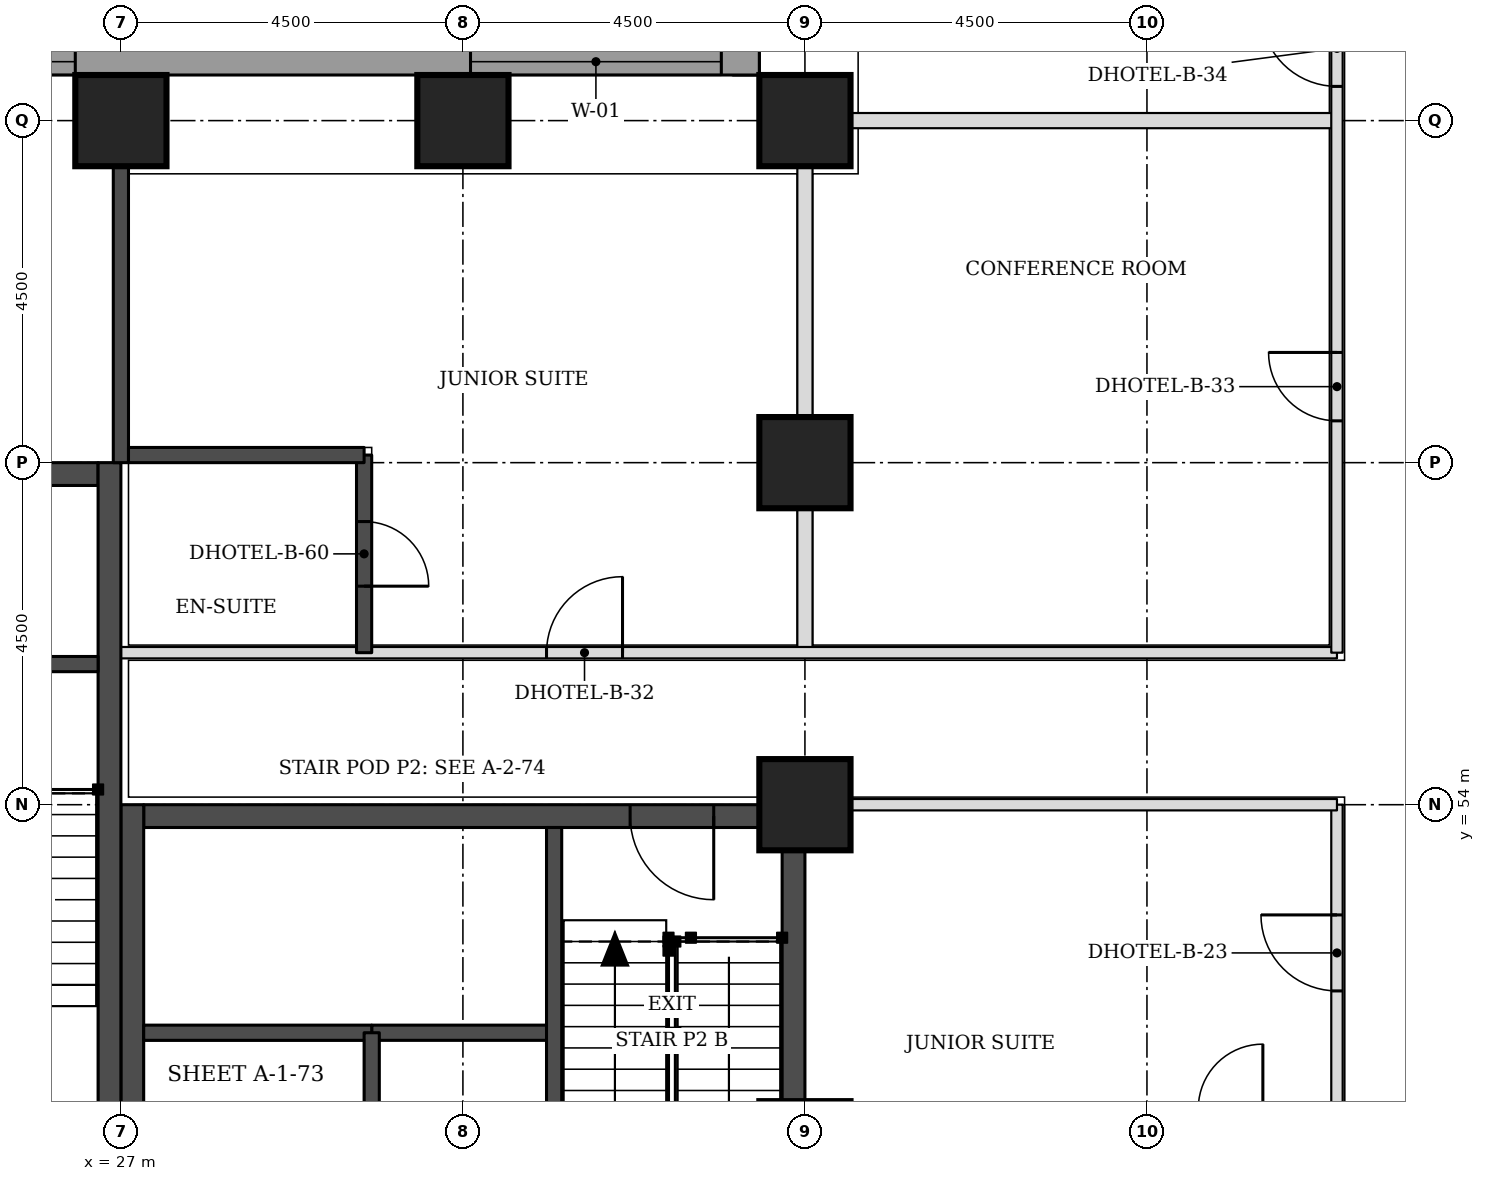
"""IFC4 building model, lengths in metres.
Left out: names, types, materials, properties, quantities, classifications, styles, units other than length and angle.
Written with IfcOpenShell. Run it as: python <this file> out.ifc"""

import sys

from ifc_helpers import new_model, si_unit, direction, frame, frame_2d, origin, origin_2d, place, context, subcontext, project, spatial, rectangle, extrude, element, fill, save


model = new_model("IFC4")
c1 = context("Model", 3, precision=1e-05, world=origin(), true_north=direction((0.0, 1.0)))
c2 = subcontext(c1, "Body", "Model", "MODEL_VIEW")
j1 = project(units=[si_unit("LENGTHUNIT", "METRE"), si_unit("PLANEANGLEUNIT", "RADIAN")], contexts=[c1])
p1 = place(None, origin())
s1 = spatial("IfcSite", under=j1, at=p1, CompositionType="ELEMENT")
p2 = place(p1, origin())
s2 = spatial("IfcBuilding", under=s1, at=p2, CompositionType="ELEMENT")
p3 = place(p2, frame((0.0, 0.0, 29.7)))
s3 = spatial("IfcBuildingStorey", under=s2, at=p3, CompositionType="ELEMENT", Elevation=29.7)
for number, where, z_axis, x_axis in (
    (1, (36.0, 54.0, 0.0), (0.0, 0.0, 1.0), (1.0, 0.0, 0.0)),
    (2, (36.0, 58.5, 0.0), (0.0, 0.0, 1.0), (1.0, 0.0, 0.0)),
    (3, (27.0, 63.0, 0.0), (0.0, 0.0, 1.0), (1.0, 0.0, 0.0)),
    (4, (31.5, 63.0, 0.0), (0.0, 0.0, 1.0), (1.0, 0.0, 0.0)),
    (5, (36.0, 63.0, 0.0), (0.0, 0.0, 1.0), (1.0, 0.0, 0.0)),
):
    element("IfcColumn", number, at=place(p3, frame(where, z_axis=z_axis, x_axis=x_axis)), inside=s3, PredefinedType="COLUMN", context=c2, shape_type="SweptSolid", body=[
        extrude(rectangle(XDim=1.2, YDim=1.2, at=origin_2d()), origin(), (0.0, 0.0, 1.0), 3.3),
    ])
p4 = place(p3, frame((27.3, 53.85, 0.0), z_axis=(0.0, 0.0, 1.0), x_axis=(1.0, 0.0, 0.0)))
e6 = element("IfcWall", 6, at=p4, inside=s3, PredefinedType="SHEAR", context=c2, shape_type="SweptSolid", body=[
    extrude(rectangle(XDim=8.4, YDim=0.3, at=frame_2d((4.2, 0.0))), origin(), (0.0, 0.0, 1.0), 3.3),
])
p5 = place(p4, frame((6.4, 0.0, 0.0)))
e7 = element("IfcOpeningElement", 7, at=p5, cuts=e6, PredefinedType="OPENING", context=c2, shape_type="SweptSolid", body=[
    extrude(rectangle(XDim=1.1, YDim=2.1, at=frame_2d((0.55, 1.05))), frame((0.0, 0.16, 0.0), z_axis=(0.0, -1.0, 0.0), x_axis=(1.0, 0.0, 0.0)), (0.0, 0.0, 1.0), 0.32),
])
p6 = place(p3, frame((27.15, 45.0, 0.0), z_axis=(0.0, 0.0, 1.0), x_axis=(0.0, 1.0, 0.0)))
e8 = element("IfcWall", 8, at=p6, inside=s3, PredefinedType="SHEAR", context=c2, shape_type="SweptSolid", body=[
    extrude(rectangle(XDim=9.0, YDim=0.3, at=frame_2d((4.5, 0.0))), origin(), (0.0, 0.0, 1.0), 3.3),
])
p7 = place(p6, frame((0.4, 0.0, 0.0)))
e9 = element("IfcOpeningElement", 9, at=p7, cuts=e8, PredefinedType="OPENING", context=c2, shape_type="SweptSolid", body=[
    extrude(rectangle(XDim=1.1, YDim=2.1, at=frame_2d((0.55, 1.05))), frame((0.0, 0.16, 0.0), z_axis=(0.0, -1.0, 0.0), x_axis=(1.0, 0.0, 0.0)), (0.0, 0.0, 1.0), 0.32),
])
p8 = place(p3, frame((35.85, 45.0, 0.0), z_axis=(0.0, 0.0, 1.0), x_axis=(0.0, 1.0, 0.0)))
e10 = element("IfcWall", 10, at=p8, inside=s3, PredefinedType="SHEAR", context=c2, shape_type="SweptSolid", body=[
    extrude(rectangle(XDim=9.0, YDim=0.3, at=frame_2d((4.5, 0.0))), origin(), (0.0, 0.0, 1.0), 3.3),
])
p9 = place(p3, frame((18.3, 58.35, 0.0), z_axis=(0.0, 0.0, 1.0), x_axis=(1.0, 0.0, 0.0)))
e11 = element("IfcWall", 11, at=p9, inside=s3, PredefinedType="SHEAR", context=c2, shape_type="SweptSolid", body=[
    extrude(rectangle(XDim=8.4, YDim=0.3, at=frame_2d((4.2, 0.0))), origin(), (0.0, 0.0, 1.0), 3.3),
])
p10 = place(p9, frame((3.3, 0.0, 0.0)))
e12 = element("IfcOpeningElement", 12, at=p10, cuts=e11, PredefinedType="OPENING", context=c2, shape_type="SweptSolid", body=[
    extrude(rectangle(XDim=1.8, YDim=2.1, at=frame_2d((0.9, 1.05))), frame((0.0, 0.16, 0.0), z_axis=(0.0, -1.0, 0.0), x_axis=(1.0, 0.0, 0.0)), (0.0, 0.0, 1.0), 0.32),
])
p11 = place(p3, frame((26.85, 49.5, 0.0), z_axis=(0.0, 0.0, 1.0), x_axis=(0.0, 1.0, 0.0)))
e13 = element("IfcWall", 13, at=p11, inside=s3, PredefinedType="SHEAR", context=c2, shape_type="SweptSolid", body=[
    extrude(rectangle(XDim=9.0, YDim=0.3, at=frame_2d((4.5, 0.0))), origin(), (0.0, 0.0, 1.0), 3.3),
])
p12 = place(p3, frame((35.225, 76.894, 0.0), z_axis=(0.0, 0.0, 1.0), x_axis=(0.0, -1.0, 0.0)))
e14 = element("IfcWall", 14, at=p12, inside=s3, PredefinedType="STANDARD", context=c2, shape_type="SweptSolid", body=[
    extrude(rectangle(XDim=13.293, YDim=0.35, at=frame_2d((6.647, 0.0))), origin(), (0.0, 0.0, 1.0), 3.055),
])
p13 = place(p12, frame((9.493, 0.0, 0.8)))
e15 = element("IfcOpeningElement", 15, at=p13, cuts=e14, PredefinedType="OPENING", context=c2, shape_type="SweptSolid", body=[
    extrude(rectangle(XDim=3.3, YDim=1.5, at=frame_2d((1.65, 0.75))), frame((0.0, 0.185, 0.0), z_axis=(0.0, -1.0, 0.0), x_axis=(1.0, 0.0, 0.0)), (0.0, 0.0, 1.0), 0.37),
])
p14 = place(p3, frame((35.4, 63.775, 0.0), z_axis=(0.0, 0.0, 1.0), x_axis=(-1.0, 0.0, 0.0)))
e16 = element("IfcWall", 16, at=p14, inside=s3, PredefinedType="STANDARD", context=c2, shape_type="SweptSolid", body=[
    extrude(rectangle(XDim=17.793, YDim=0.35, at=frame_2d((8.897, 0.0))), origin(), (0.0, 0.0, 1.0), 3.055),
])
p15 = place(p14, frame((0.5, 0.0, 0.8)))
e17 = element("IfcOpeningElement", 17, at=p15, cuts=e16, PredefinedType="OPENING", context=c2, shape_type="SweptSolid", body=[
    extrude(rectangle(XDim=3.3, YDim=1.5, at=frame_2d((1.65, 0.75))), frame((0.0, 0.185, 0.0), z_axis=(0.0, -1.0, 0.0), x_axis=(1.0, 0.0, 0.0)), (0.0, 0.0, 1.0), 0.37),
])
p16 = place(p14, frame((9.0, 0.0, 0.8)))
e18 = element("IfcOpeningElement", 18, at=p16, cuts=e16, PredefinedType="OPENING", context=c2, shape_type="SweptSolid", body=[
    extrude(rectangle(XDim=3.3, YDim=1.5, at=frame_2d((1.65, 0.75))), frame((0.0, 0.185, 0.0), z_axis=(0.0, -1.0, 0.0), x_axis=(1.0, 0.0, 0.0)), (0.0, 0.0, 1.0), 0.37),
])
p17 = place(p3, frame((36.0, 56.0, 0.0), z_axis=(0.0, 0.0, 1.0), x_axis=(0.0, 1.0, 0.0)))
e19 = element("IfcWall", 19, at=p17, inside=s3, PredefinedType="PARTITIONING", context=c2, shape_type="SweptSolid", body=[
    extrude(rectangle(XDim=6.4, YDim=0.2, at=frame_2d((3.2, 0.0))), origin(), (0.0, 0.0, 1.0), 2.33),
])
p18 = place(p3, frame((36.6, 63.0, 0.0), z_axis=(0.0, 0.0, 1.0), x_axis=(1.0, 0.0, 0.0)))
e20 = element("IfcWall", 20, at=p18, inside=s3, PredefinedType="PARTITIONING", context=c2, shape_type="SweptSolid", body=[
    extrude(rectangle(XDim=6.4, YDim=0.2, at=frame_2d((3.2, 0.0))), origin(), (0.0, 0.0, 1.0), 3.08),
])
p19 = place(p3, frame((43.0, 47.5, 0.0), z_axis=(0.0, 0.0, 1.0), x_axis=(0.0, 1.0, 0.0)))
e21 = element("IfcWall", 21, at=p19, inside=s3, PredefinedType="PARTITIONING", context=c2, shape_type="SweptSolid", body=[
    extrude(rectangle(XDim=6.5, YDim=0.15, at=frame_2d((3.25, 0.0))), origin(), (0.0, 0.0, 1.0), 3.08),
])
p20 = place(p19, frame((4.05, 0.0, 0.0)))
e22 = element("IfcOpeningElement", 22, at=p20, cuts=e21, PredefinedType="OPENING", context=c2, shape_type="SweptSolid", body=[
    extrude(rectangle(XDim=1.0, YDim=2.1, at=frame_2d((0.5, 1.05))), frame((0.0, 0.085, 0.0), z_axis=(0.0, -1.0, 0.0), x_axis=(1.0, 0.0, 0.0)), (0.0, 0.0, 1.0), 0.17),
])
p21 = place(p3, frame((36.05, 54.0, 0.0), z_axis=(0.0, 0.0, 1.0), x_axis=(1.0, 0.0, 0.0)))
e23 = element("IfcWall", 23, at=p21, inside=s3, PredefinedType="PARTITIONING", context=c2, shape_type="SweptSolid", body=[
    extrude(rectangle(XDim=6.95, YDim=0.15, at=frame_2d((3.475, 0.0))), origin(), (0.0, 0.0, 1.0), 3.08),
])
p22 = place(p3, frame((27.0, 56.0, 0.0), z_axis=(0.0, 0.0, 1.0), x_axis=(1.0, 0.0, 0.0)))
e24 = element("IfcWall", 24, at=p22, inside=s3, PredefinedType="PARTITIONING", context=c2, shape_type="SweptSolid", body=[
    extrude(rectangle(XDim=16.0, YDim=0.15, at=frame_2d((8.0, 0.0))), origin(), (0.0, 0.0, 1.0), 3.08),
])
p23 = place(p22, frame((5.6, 0.0, 0.0)))
e25 = element("IfcOpeningElement", 25, at=p23, cuts=e24, PredefinedType="OPENING", context=c2, shape_type="SweptSolid", body=[
    extrude(rectangle(XDim=1.0, YDim=2.1, at=frame_2d((0.5, 1.05))), frame((0.0, 0.085, 0.0), z_axis=(0.0, -1.0, 0.0), x_axis=(1.0, 0.0, 0.0)), (0.0, 0.0, 1.0), 0.17),
])
p24 = place(p3, frame((43.0, 56.0, 0.0), z_axis=(0.0, 0.0, 1.0), x_axis=(0.0, 1.0, 0.0)))
e26 = element("IfcWall", 26, at=p24, inside=s3, PredefinedType="PARTITIONING", context=c2, shape_type="SweptSolid", body=[
    extrude(rectangle(XDim=18.0, YDim=0.15, at=frame_2d((9.0, 0.0))), origin(), (0.0, 0.0, 1.0), 3.08),
])
p25 = place(p24, frame((7.45, 0.0, 0.0)))
e27 = element("IfcOpeningElement", 27, at=p25, cuts=e26, PredefinedType="OPENING", context=c2, shape_type="SweptSolid", body=[
    extrude(rectangle(XDim=1.0, YDim=2.1, at=frame_2d((0.5, 1.05))), frame((0.0, 0.085, 0.0), z_axis=(0.0, -1.0, 0.0), x_axis=(1.0, 0.0, 0.0)), (0.0, 0.0, 1.0), 0.17),
])
p26 = place(p24, frame((14.3, 0.0, 0.0)))
e28 = element("IfcOpeningElement", 28, at=p26, cuts=e26, PredefinedType="OPENING", context=c2, shape_type="SweptSolid", body=[
    extrude(rectangle(XDim=1.0, YDim=2.1, at=frame_2d((0.5, 1.05))), frame((0.0, 0.085, 0.0), z_axis=(0.0, -1.0, 0.0), x_axis=(1.0, 0.0, 0.0)), (0.0, 0.0, 1.0), 0.17),
])
p27 = place(p24, frame((16.45, 0.0, 0.0)))
e29 = element("IfcOpeningElement", 29, at=p27, cuts=e26, PredefinedType="OPENING", context=c2, shape_type="SweptSolid", body=[
    extrude(rectangle(XDim=1.0, YDim=2.1, at=frame_2d((0.5, 1.05))), frame((0.0, 0.085, 0.0), z_axis=(0.0, -1.0, 0.0), x_axis=(1.0, 0.0, 0.0)), (0.0, 0.0, 1.0), 0.17),
])
p28 = place(p24, frame((3.05, 0.0, 0.0)))
e30 = element("IfcOpeningElement", 30, at=p28, cuts=e26, PredefinedType="OPENING", context=c2, shape_type="SweptSolid", body=[
    extrude(rectangle(XDim=0.9, YDim=2.1, at=frame_2d((0.45, 1.05))), frame((0.0, 0.085, 0.0), z_axis=(0.0, -1.0, 0.0), x_axis=(1.0, 0.0, 0.0)), (0.0, 0.0, 1.0), 0.17),
])
p29 = place(p3, frame((27.0, 58.5, 0.0), z_axis=(0.0, 0.0, 1.0), x_axis=(0.0, 1.0, 0.0)))
e31 = element("IfcWall", 31, at=p29, inside=s3, PredefinedType="SOLIDWALL", context=c2, shape_type="SweptSolid", body=[
    extrude(rectangle(XDim=3.9, YDim=0.2, at=frame_2d((1.95, 0.0))), origin(), (0.0, 0.0, 1.0), 3.08),
])
p30 = place(p3, frame((30.2, 56.0, 0.0), z_axis=(0.0, 0.0, 1.0), x_axis=(0.0, 1.0, 0.0)))
e32 = element("IfcWall", 32, at=p30, inside=s3, PredefinedType="SOLIDWALL", context=c2, shape_type="SweptSolid", body=[
    extrude(rectangle(XDim=2.6, YDim=0.2, at=frame_2d((1.3, 0.0))), origin(), (0.0, 0.0, 1.0), 3.08),
])
p31 = place(p30, frame((0.875, 0.0, 0.0)))
e33 = element("IfcOpeningElement", 33, at=p31, cuts=e32, PredefinedType="OPENING", context=c2, shape_type="SweptSolid", body=[
    extrude(rectangle(XDim=0.85, YDim=2.1, at=frame_2d((0.425, 1.05))), frame((0.0, 0.11, 0.0), z_axis=(0.0, -1.0, 0.0), x_axis=(1.0, 0.0, 0.0)), (0.0, 0.0, 1.0), 0.22),
])
p32 = place(p3, frame((27.1, 58.6, 0.0), z_axis=(0.0, 0.0, 1.0), x_axis=(1.0, 0.0, 0.0)))
e34 = element("IfcWall", 34, at=p32, inside=s3, PredefinedType="SOLIDWALL", context=c2, shape_type="SweptSolid", body=[
    extrude(rectangle(XDim=3.1, YDim=0.2, at=frame_2d((1.55, 0.0))), origin(), (0.0, 0.0, 1.0), 3.08),
])
p33 = place(p3, frame((30.3, 51.0, 0.0), z_axis=(0.0, 0.0, 1.0), x_axis=(1.0, 0.0, 0.0)))
e35 = element("IfcWall", 35, at=p33, inside=s3, PredefinedType="SOLIDWALL", context=c2, shape_type="SweptSolid", body=[
    extrude(rectangle(XDim=2.4, YDim=0.2, at=frame_2d((1.2, 0.0))), origin(), (0.0, 0.0, 1.0), 3.3),
])
p34 = place(p3, frame((27.3, 51.0, 0.0), z_axis=(0.0, 0.0, 1.0), x_axis=(1.0, 0.0, 0.0)))
e36 = element("IfcWall", 36, at=p34, inside=s3, PredefinedType="SOLIDWALL", context=c2, shape_type="SweptSolid", body=[
    extrude(rectangle(XDim=3.0, YDim=0.2, at=frame_2d((1.5, 0.0))), origin(), (0.0, 0.0, 1.0), 3.08),
])
for number, where, z_axis, x_axis in (
    (37, (30.3, 45.3, 0.0), (0.0, 0.0, 1.0), (0.0, 1.0, 0.0)),
    (38, (32.7, 48.0, 0.0), (0.0, 0.0, 1.0), (0.0, 1.0, 0.0)),
):
    element("IfcWall", number, at=place(p3, frame(where, z_axis=z_axis, x_axis=x_axis)), inside=s3, PredefinedType="SOLIDWALL", context=c2, shape_type="SweptSolid", body=[
        extrude(rectangle(XDim=5.7, YDim=0.2, at=frame_2d((2.85, 0.0))), origin(), (0.0, 0.0, 1.0), 3.08),
    ])
p35 = place(p3, frame((23.2, 55.85, 0.0), z_axis=(0.0, 0.0, 1.0), x_axis=(1.0, 0.0, 0.0)))
e39 = element("IfcWall", 39, at=p35, inside=s3, PredefinedType="SOLIDWALL", context=c2, shape_type="SweptSolid", body=[
    extrude(rectangle(XDim=3.5, YDim=0.2, at=frame_2d((1.75, 0.0))), origin(), (0.0, 0.0, 1.0), 3.08),
])
p36 = place(p35, frame((1.2, 0.0, 0.0)))
e40 = element("IfcOpeningElement", 40, at=p36, cuts=e39, PredefinedType="OPENING", context=c2, shape_type="SweptSolid", body=[
    extrude(rectangle(XDim=1.1, YDim=2.1, at=frame_2d((0.55, 1.05))), frame((0.0, 0.11, 0.0), z_axis=(0.0, -1.0, 0.0), x_axis=(1.0, 0.0, 0.0)), (0.0, 0.0, 1.0), 0.22),
])
p37 = place(p15, origin())
e41 = element("IfcWindow", 41, at=p37, inside=s3, PartitioningType="SINGLE_PANEL", PredefinedType="WINDOW", context=c2, shape_type="SweptSolid", body=[
    extrude(rectangle(XDim=3.3, YDim=1.5, at=frame_2d((1.65, 0.75))), frame((0.0, 0.085, 0.0), z_axis=(0.0, -1.0, 0.0), x_axis=(1.0, 0.0, 0.0)), (0.0, 0.0, 1.0), 0.06),
])
fill(e17, e41)
p38 = place(p16, origin())
e42 = element("IfcWindow", 42, at=p38, inside=s3, PartitioningType="SINGLE_PANEL", PredefinedType="WINDOW", context=c2, shape_type="SweptSolid", body=[
    extrude(rectangle(XDim=3.3, YDim=1.5, at=frame_2d((1.65, 0.75))), frame((0.0, 0.085, 0.0), z_axis=(0.0, -1.0, 0.0), x_axis=(1.0, 0.0, 0.0)), (0.0, 0.0, 1.0), 0.06),
])
fill(e18, e42)
p39 = place(p23, origin())
e43 = element("IfcDoor", 43, at=p39, inside=s3, OperationType="SINGLE_SWING_RIGHT", PredefinedType="DOOR", context=c2, shape_type="SweptSolid", body=[
    extrude(rectangle(XDim=1.0, YDim=2.1, at=frame_2d((0.5, 1.05))), frame((0.0, 0.025, 0.0), z_axis=(0.0, -1.0, 0.0), x_axis=(1.0, 0.0, 0.0)), (0.0, 0.0, 1.0), 0.05),
])
fill(e25, e43)
p40 = place(p31, frame((0.85, 0.0, 0.0), z_axis=(0.0, 0.0, 1.0), x_axis=(-1.0, 0.0, 0.0)))
e44 = element("IfcDoor", 44, at=p40, inside=s3, OperationType="SINGLE_SWING_RIGHT", PredefinedType="DOOR", context=c2, shape_type="SweptSolid", body=[
    extrude(rectangle(XDim=0.85, YDim=2.1, at=frame_2d((0.425, 1.05))), frame((0.0, 0.025, 0.0), z_axis=(0.0, -1.0, 0.0), x_axis=(1.0, 0.0, 0.0)), (0.0, 0.0, 1.0), 0.05),
])
fill(e33, e44)
p41 = place(p25, origin())
e45 = element("IfcDoor", 45, at=p41, inside=s3, OperationType="SINGLE_SWING_RIGHT", PredefinedType="DOOR", context=c2, shape_type="SweptSolid", body=[
    extrude(rectangle(XDim=1.0, YDim=2.1, at=frame_2d((0.5, 1.05))), frame((0.0, 0.025, 0.0), z_axis=(0.0, -1.0, 0.0), x_axis=(1.0, 0.0, 0.0)), (0.0, 0.0, 1.0), 0.05),
])
fill(e27, e45)
p42 = place(p28, origin())
e46 = element("IfcDoor", 46, at=p42, inside=s3, OperationType="SINGLE_SWING_RIGHT", PredefinedType="DOOR", context=c2, shape_type="SweptSolid", body=[
    extrude(rectangle(XDim=0.9, YDim=2.1, at=frame_2d((0.45, 1.05))), frame((0.0, 0.025, 0.0), z_axis=(0.0, -1.0, 0.0), x_axis=(1.0, 0.0, 0.0)), (0.0, 0.0, 1.0), 0.05),
])
fill(e30, e46)
p43 = place(p20, origin())
e47 = element("IfcDoor", 47, at=p43, inside=s3, OperationType="SINGLE_SWING_RIGHT", PredefinedType="DOOR", context=c2, shape_type="SweptSolid", body=[
    extrude(rectangle(XDim=1.0, YDim=2.1, at=frame_2d((0.5, 1.05))), frame((0.0, 0.025, 0.0), z_axis=(0.0, -1.0, 0.0), x_axis=(1.0, 0.0, 0.0)), (0.0, 0.0, 1.0), 0.05),
])
fill(e22, e47)
p44 = place(p5, frame((1.1, 0.0, 0.0), z_axis=(0.0, 0.0, 1.0), x_axis=(-1.0, 0.0, 0.0)))
e48 = element("IfcDoor", 48, at=p44, inside=s3, OperationType="SINGLE_SWING_LEFT", PredefinedType="DOOR", context=c2, shape_type="SweptSolid", body=[
    extrude(rectangle(XDim=1.1, YDim=2.1, at=frame_2d((0.55, 1.05))), frame((0.0, 0.025, 0.0), z_axis=(0.0, -1.0, 0.0), x_axis=(1.0, 0.0, 0.0)), (0.0, 0.0, 1.0), 0.05),
])
fill(e7, e48)
save(model, sys.argv[1])
